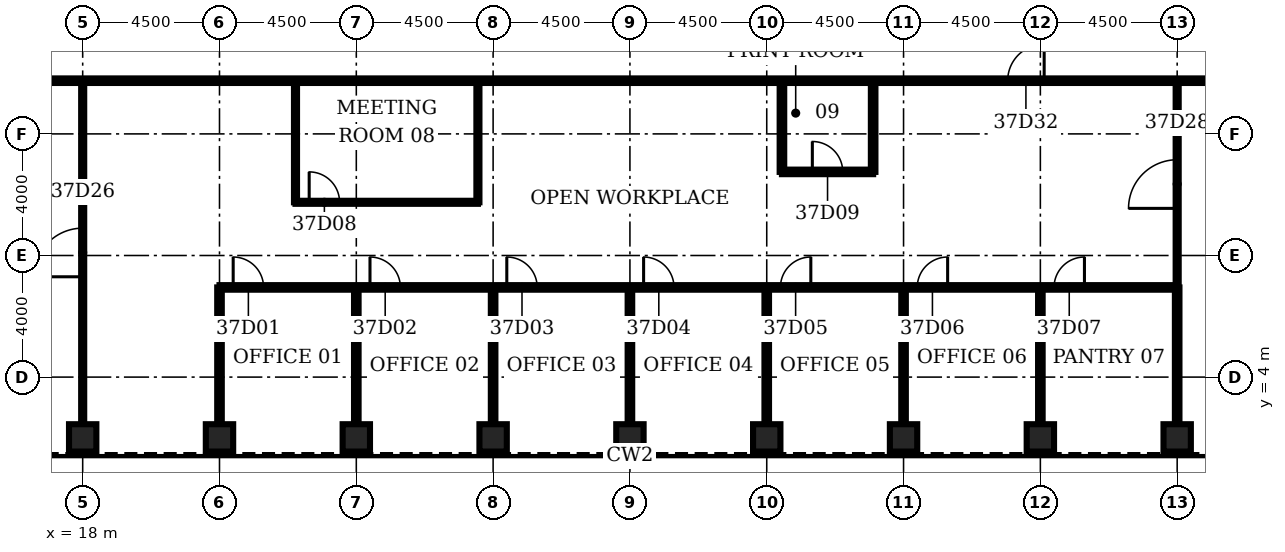
"""IFC4 building model, lengths in metres.
Left out: names, types, materials, properties, quantities, classifications, styles, units other than length and angle.
Written with IfcOpenShell. Run it as: python <this file> out.ifc"""

import sys

from ifc_helpers import new_model, si_unit, direction, frame, frame_2d, origin, origin_2d, place, context, subcontext, project, spatial, rectangle, hollow_rectangle, extrude, element, fill, save


model = new_model("IFC4")
c1 = context("Model", 3, precision=1e-05, world=origin(), true_north=direction((0.0, 1.0)))
c2 = subcontext(c1, "Body", "Model", "MODEL_VIEW")
j1 = project(units=[si_unit("LENGTHUNIT", "METRE"), si_unit("PLANEANGLEUNIT", "RADIAN")], contexts=[c1])
p1 = place(None, origin())
s1 = spatial("IfcSite", under=j1, at=p1, CompositionType="ELEMENT")
p2 = place(p1, origin())
s2 = spatial("IfcBuilding", under=s1, at=p2, CompositionType="ELEMENT")
p3 = place(p2, frame((0.0, 0.0, 167.7)))
s3 = spatial("IfcBuildingStorey", under=s2, at=p3, CompositionType="ELEMENT", Elevation=167.7)
for number, where, z_axis, x_axis in (
    (1, (18.0, 2.0, 0.0), (0.0, 0.0, 1.0), (0.0, 1.0, 0.0)),
    (2, (22.5, 2.0, 0.0), (0.0, 0.0, 1.0), (0.0, 1.0, 0.0)),
    (3, (27.0, 2.0, 0.0), (0.0, 0.0, 1.0), (0.0, 1.0, 0.0)),
    (4, (31.5, 2.0, 0.0), (0.0, 0.0, 1.0), (0.0, 1.0, 0.0)),
    (5, (36.0, 2.0, 0.0), (0.0, 0.0, 1.0), (0.0, 1.0, 0.0)),
    (6, (40.5, 2.0, 0.0), (0.0, 0.0, 1.0), (0.0, 1.0, 0.0)),
    (7, (45.0, 2.0, 0.0), (0.0, 0.0, 1.0), (0.0, 1.0, 0.0)),
    (8, (49.5, 2.0, 0.0), (0.0, 0.0, 1.0), (0.0, 1.0, 0.0)),
    (9, (54.0, 2.0, 0.0), (0.0, 0.0, 1.0), (0.0, 1.0, 0.0)),
):
    element("IfcColumn", number, at=place(p3, frame(where, z_axis=z_axis, x_axis=x_axis)), inside=s3, PredefinedType="COLUMN", context=c2, shape_type="SweptSolid", body=[
        extrude(hollow_rectangle(XDim=0.9, YDim=0.9, WallThickness=0.09, at=origin_2d()), origin(), (0.0, 0.0, 1.0), 4.2),
    ])
p4 = place(p3, frame((22.5, 6.95, 0.0), z_axis=(0.0, 0.0, 1.0), x_axis=(1.0, 0.0, 0.0)))
e10 = element("IfcWall", 10, at=p4, inside=s3, PredefinedType="PARTITIONING", context=c2, shape_type="SweptSolid", body=[
    extrude(rectangle(XDim=31.5, YDim=0.15, at=frame_2d((15.75, 0.0))), origin(), (0.0, 0.0, 1.0), 3.0),
])
p5 = place(p4, frame((0.45, 0.0, 0.0)))
e11 = element("IfcOpeningElement", 11, at=p5, cuts=e10, PredefinedType="OPENING", context=c2, shape_type="SweptSolid", body=[
    extrude(rectangle(XDim=1.0, YDim=2.1, at=frame_2d((0.5, 1.05))), frame((0.0, 0.085, 0.0), z_axis=(0.0, -1.0, 0.0), x_axis=(1.0, 0.0, 0.0)), (0.0, 0.0, 1.0), 0.17),
])
p6 = place(p4, frame((4.95, 0.0, 0.0)))
e12 = element("IfcOpeningElement", 12, at=p6, cuts=e10, PredefinedType="OPENING", context=c2, shape_type="SweptSolid", body=[
    extrude(rectangle(XDim=1.0, YDim=2.1, at=frame_2d((0.5, 1.05))), frame((0.0, 0.085, 0.0), z_axis=(0.0, -1.0, 0.0), x_axis=(1.0, 0.0, 0.0)), (0.0, 0.0, 1.0), 0.17),
])
p7 = place(p4, frame((9.45, 0.0, 0.0)))
e13 = element("IfcOpeningElement", 13, at=p7, cuts=e10, PredefinedType="OPENING", context=c2, shape_type="SweptSolid", body=[
    extrude(rectangle(XDim=1.0, YDim=2.1, at=frame_2d((0.5, 1.05))), frame((0.0, 0.085, 0.0), z_axis=(0.0, -1.0, 0.0), x_axis=(1.0, 0.0, 0.0)), (0.0, 0.0, 1.0), 0.17),
])
p8 = place(p4, frame((13.95, 0.0, 0.0)))
e14 = element("IfcOpeningElement", 14, at=p8, cuts=e10, PredefinedType="OPENING", context=c2, shape_type="SweptSolid", body=[
    extrude(rectangle(XDim=1.0, YDim=2.1, at=frame_2d((0.5, 1.05))), frame((0.0, 0.085, 0.0), z_axis=(0.0, -1.0, 0.0), x_axis=(1.0, 0.0, 0.0)), (0.0, 0.0, 1.0), 0.17),
])
p9 = place(p4, frame((18.45, 0.0, 0.0)))
e15 = element("IfcOpeningElement", 15, at=p9, cuts=e10, PredefinedType="OPENING", context=c2, shape_type="SweptSolid", body=[
    extrude(rectangle(XDim=1.0, YDim=2.1, at=frame_2d((0.5, 1.05))), frame((0.0, 0.085, 0.0), z_axis=(0.0, -1.0, 0.0), x_axis=(1.0, 0.0, 0.0)), (0.0, 0.0, 1.0), 0.17),
])
p10 = place(p4, frame((22.95, 0.0, 0.0)))
e16 = element("IfcOpeningElement", 16, at=p10, cuts=e10, PredefinedType="OPENING", context=c2, shape_type="SweptSolid", body=[
    extrude(rectangle(XDim=1.0, YDim=2.1, at=frame_2d((0.5, 1.05))), frame((0.0, 0.085, 0.0), z_axis=(0.0, -1.0, 0.0), x_axis=(1.0, 0.0, 0.0)), (0.0, 0.0, 1.0), 0.17),
])
p11 = place(p4, frame((27.45, 0.0, 0.0)))
e17 = element("IfcOpeningElement", 17, at=p11, cuts=e10, PredefinedType="OPENING", context=c2, shape_type="SweptSolid", body=[
    extrude(rectangle(XDim=1.0, YDim=2.1, at=frame_2d((0.5, 1.05))), frame((0.0, 0.085, 0.0), z_axis=(0.0, -1.0, 0.0), x_axis=(1.0, 0.0, 0.0)), (0.0, 0.0, 1.0), 0.17),
])
p12 = place(p3, frame((25.0, 9.75, 0.0), z_axis=(0.0, 0.0, 1.0), x_axis=(1.0, 0.0, 0.0)))
e18 = element("IfcWall", 18, at=p12, inside=s3, PredefinedType="PARTITIONING", context=c2, shape_type="SweptSolid", body=[
    extrude(rectangle(XDim=6.0, YDim=0.1, at=frame_2d((3.0, 0.0))), origin(), (0.0, 0.0, 1.0), 3.0),
])
p13 = place(p12, frame((0.45, 0.0, 0.0)))
e19 = element("IfcOpeningElement", 19, at=p13, cuts=e18, PredefinedType="OPENING", context=c2, shape_type="SweptSolid", body=[
    extrude(rectangle(XDim=1.0, YDim=2.1, at=frame_2d((0.5, 1.05))), frame((0.0, 0.06, 0.0), z_axis=(0.0, -1.0, 0.0), x_axis=(1.0, 0.0, 0.0)), (0.0, 0.0, 1.0), 0.12),
])
p14 = place(p3, frame((41.0, 10.75, 0.0), z_axis=(0.0, 0.0, 1.0), x_axis=(1.0, 0.0, 0.0)))
e20 = element("IfcWall", 20, at=p14, inside=s3, PredefinedType="PARTITIONING", context=c2, shape_type="SweptSolid", body=[
    extrude(rectangle(XDim=3.0, YDim=0.15, at=frame_2d((1.5, 0.0))), origin(), (0.0, 0.0, 1.0), 3.0),
])
p15 = place(p14, frame((1.0, 0.0, 0.0)))
e21 = element("IfcOpeningElement", 21, at=p15, cuts=e20, PredefinedType="OPENING", context=c2, shape_type="SweptSolid", body=[
    extrude(rectangle(XDim=1.0, YDim=2.1, at=frame_2d((0.5, 1.05))), frame((0.0, 0.085, 0.0), z_axis=(0.0, -1.0, 0.0), x_axis=(1.0, 0.0, 0.0)), (0.0, 0.0, 1.0), 0.17),
])
p16 = place(p3, frame((15.15, 13.75, 0.0), z_axis=(0.0, 0.0, 1.0), x_axis=(1.0, 0.0, 0.0)))
e22 = element("IfcWall", 22, at=p16, inside=s3, PredefinedType="PARTITIONING", context=c2, shape_type="SweptSolid", body=[
    extrude(rectangle(XDim=41.7, YDim=0.15, at=frame_2d((20.85, 0.0))), origin(), (0.0, 0.0, 1.0), 3.0),
])
p17 = place(p16, frame((33.275, 0.0, 0.0)))
e23 = element("IfcOpeningElement", 23, at=p17, cuts=e22, PredefinedType="OPENING", context=c2, shape_type="SweptSolid", body=[
    extrude(rectangle(XDim=1.2, YDim=2.1, at=frame_2d((0.6, 1.05))), frame((0.0, 0.085, 0.0), z_axis=(0.0, -1.0, 0.0), x_axis=(1.0, 0.0, 0.0)), (0.0, 0.0, 1.0), 0.17),
])
p18 = place(p3, frame((18.0, 2.45, 0.0), z_axis=(0.0, 0.0, 1.0), x_axis=(0.0, 1.0, 0.0)))
e24 = element("IfcWall", 24, at=p18, inside=s3, PredefinedType="PARTITIONING", context=c2, shape_type="SweptSolid", body=[
    extrude(rectangle(XDim=11.3, YDim=0.1, at=frame_2d((5.65, 0.0))), origin(), (0.0, 0.0, 1.0), 3.0),
])
p19 = place(p18, frame((4.85, 0.0, 0.0)))
e25 = element("IfcOpeningElement", 25, at=p19, cuts=e24, PredefinedType="OPENING", context=c2, shape_type="SweptSolid", body=[
    extrude(rectangle(XDim=1.6, YDim=2.1, at=frame_2d((0.8, 1.05))), frame((0.0, 0.06, 0.0), z_axis=(0.0, -1.0, 0.0), x_axis=(1.0, 0.0, 0.0)), (0.0, 0.0, 1.0), 0.12),
])
p20 = place(p3, frame((22.5, 2.45, 0.0), z_axis=(0.0, 0.0, 1.0), x_axis=(0.0, 1.0, 0.0)))
e26 = element("IfcWall", 26, at=p20, inside=s3, PredefinedType="PARTITIONING", context=c2, shape_type="SweptSolid", body=[
    extrude(rectangle(XDim=4.5, YDim=0.15, at=frame_2d((2.25, 0.0))), origin(), (0.0, 0.0, 1.0), 3.0),
])
p21 = place(p3, frame((25.0, 9.75, 0.0), z_axis=(0.0, 0.0, 1.0), x_axis=(0.0, 1.0, 0.0)))
e27 = element("IfcWall", 27, at=p21, inside=s3, PredefinedType="PARTITIONING", context=c2, shape_type="SweptSolid", body=[
    extrude(rectangle(XDim=4.0, YDim=0.1, at=frame_2d((2.0, 0.0))), origin(), (0.0, 0.0, 1.0), 3.0),
])
p22 = place(p3, frame((27.0, 2.45, 0.0), z_axis=(0.0, 0.0, 1.0), x_axis=(0.0, 1.0, 0.0)))
e28 = element("IfcWall", 28, at=p22, inside=s3, PredefinedType="PARTITIONING", context=c2, shape_type="SweptSolid", body=[
    extrude(rectangle(XDim=4.5, YDim=0.15, at=frame_2d((2.25, 0.0))), origin(), (0.0, 0.0, 1.0), 3.0),
])
p23 = place(p3, frame((31.0, 9.75, 0.0), z_axis=(0.0, 0.0, 1.0), x_axis=(0.0, 1.0, 0.0)))
e29 = element("IfcWall", 29, at=p23, inside=s3, PredefinedType="PARTITIONING", context=c2, shape_type="SweptSolid", body=[
    extrude(rectangle(XDim=4.0, YDim=0.1, at=frame_2d((2.0, 0.0))), origin(), (0.0, 0.0, 1.0), 3.0),
])
for number, where, z_axis, x_axis in (
    (30, (31.5, 2.45, 0.0), (0.0, 0.0, 1.0), (0.0, 1.0, 0.0)),
    (31, (36.0, 2.45, 0.0), (0.0, 0.0, 1.0), (0.0, 1.0, 0.0)),
    (32, (40.5, 2.45, 0.0), (0.0, 0.0, 1.0), (0.0, 1.0, 0.0)),
):
    element("IfcWall", number, at=place(p3, frame(where, z_axis=z_axis, x_axis=x_axis)), inside=s3, PredefinedType="PARTITIONING", context=c2, shape_type="SweptSolid", body=[
        extrude(rectangle(XDim=4.5, YDim=0.15, at=frame_2d((2.25, 0.0))), origin(), (0.0, 0.0, 1.0), 3.0),
    ])
for number, where, z_axis, x_axis in (
    (33, (41.0, 10.75, 0.0), (0.0, 0.0, 1.0), (0.0, 1.0, 0.0)),
    (34, (44.0, 10.75, 0.0), (0.0, 0.0, 1.0), (0.0, 1.0, 0.0)),
):
    element("IfcWall", number, at=place(p3, frame(where, z_axis=z_axis, x_axis=x_axis)), inside=s3, PredefinedType="PARTITIONING", context=c2, shape_type="SweptSolid", body=[
        extrude(rectangle(XDim=3.0, YDim=0.15, at=frame_2d((1.5, 0.0))), origin(), (0.0, 0.0, 1.0), 3.0),
    ])
for number, where, z_axis, x_axis in (
    (35, (45.0, 2.45, 0.0), (0.0, 0.0, 1.0), (0.0, 1.0, 0.0)),
    (36, (49.5, 2.45, 0.0), (0.0, 0.0, 1.0), (0.0, 1.0, 0.0)),
    (37, (54.0, 2.45, 0.0), (0.0, 0.0, 1.0), (0.0, 1.0, 0.0)),
):
    element("IfcWall", number, at=place(p3, frame(where, z_axis=z_axis, x_axis=x_axis)), inside=s3, PredefinedType="PARTITIONING", context=c2, shape_type="SweptSolid", body=[
        extrude(rectangle(XDim=4.5, YDim=0.15, at=frame_2d((2.25, 0.0))), origin(), (0.0, 0.0, 1.0), 3.0),
    ])
p24 = place(p3, frame((54.0, 6.95, 0.0), z_axis=(0.0, 0.0, 1.0), x_axis=(0.0, 1.0, 0.0)))
e38 = element("IfcWall", 38, at=p24, inside=s3, PredefinedType="PARTITIONING", context=c2, shape_type="SweptSolid", body=[
    extrude(rectangle(XDim=6.8, YDim=0.1, at=frame_2d((3.4, 0.0))), origin(), (0.0, 0.0, 1.0), 3.0),
])
p25 = place(p24, frame((2.6, 0.0, 0.0)))
e39 = element("IfcOpeningElement", 39, at=p25, cuts=e38, PredefinedType="OPENING", context=c2, shape_type="SweptSolid", body=[
    extrude(rectangle(XDim=1.6, YDim=2.1, at=frame_2d((0.8, 1.05))), frame((0.0, 0.06, 0.0), z_axis=(0.0, -1.0, 0.0), x_axis=(1.0, 0.0, 0.0)), (0.0, 0.0, 1.0), 0.12),
])
p26 = place(p5, origin())
e40 = element("IfcDoor", 40, at=p26, inside=s3, OperationType="SINGLE_SWING_LEFT", PredefinedType="DOOR", context=c2, shape_type="SweptSolid", body=[
    extrude(rectangle(XDim=1.0, YDim=2.1, at=frame_2d((0.5, 1.05))), frame((0.0, 0.025, 0.0), z_axis=(0.0, -1.0, 0.0), x_axis=(1.0, 0.0, 0.0)), (0.0, 0.0, 1.0), 0.05),
])
fill(e11, e40)
p27 = place(p6, origin())
e41 = element("IfcDoor", 41, at=p27, inside=s3, OperationType="SINGLE_SWING_LEFT", PredefinedType="DOOR", context=c2, shape_type="SweptSolid", body=[
    extrude(rectangle(XDim=1.0, YDim=2.1, at=frame_2d((0.5, 1.05))), frame((0.0, 0.025, 0.0), z_axis=(0.0, -1.0, 0.0), x_axis=(1.0, 0.0, 0.0)), (0.0, 0.0, 1.0), 0.05),
])
fill(e12, e41)
p28 = place(p7, origin())
e42 = element("IfcDoor", 42, at=p28, inside=s3, OperationType="SINGLE_SWING_LEFT", PredefinedType="DOOR", context=c2, shape_type="SweptSolid", body=[
    extrude(rectangle(XDim=1.0, YDim=2.1, at=frame_2d((0.5, 1.05))), frame((0.0, 0.025, 0.0), z_axis=(0.0, -1.0, 0.0), x_axis=(1.0, 0.0, 0.0)), (0.0, 0.0, 1.0), 0.05),
])
fill(e13, e42)
p29 = place(p8, origin())
e43 = element("IfcDoor", 43, at=p29, inside=s3, OperationType="SINGLE_SWING_LEFT", PredefinedType="DOOR", context=c2, shape_type="SweptSolid", body=[
    extrude(rectangle(XDim=1.0, YDim=2.1, at=frame_2d((0.5, 1.05))), frame((0.0, 0.025, 0.0), z_axis=(0.0, -1.0, 0.0), x_axis=(1.0, 0.0, 0.0)), (0.0, 0.0, 1.0), 0.05),
])
fill(e14, e43)
p30 = place(p9, origin())
e44 = element("IfcDoor", 44, at=p30, inside=s3, OperationType="SINGLE_SWING_RIGHT", PredefinedType="DOOR", context=c2, shape_type="SweptSolid", body=[
    extrude(rectangle(XDim=1.0, YDim=2.1, at=frame_2d((0.5, 1.05))), frame((0.0, 0.025, 0.0), z_axis=(0.0, -1.0, 0.0), x_axis=(1.0, 0.0, 0.0)), (0.0, 0.0, 1.0), 0.05),
])
fill(e15, e44)
p31 = place(p10, origin())
e45 = element("IfcDoor", 45, at=p31, inside=s3, OperationType="SINGLE_SWING_RIGHT", PredefinedType="DOOR", context=c2, shape_type="SweptSolid", body=[
    extrude(rectangle(XDim=1.0, YDim=2.1, at=frame_2d((0.5, 1.05))), frame((0.0, 0.025, 0.0), z_axis=(0.0, -1.0, 0.0), x_axis=(1.0, 0.0, 0.0)), (0.0, 0.0, 1.0), 0.05),
])
fill(e16, e45)
p32 = place(p11, origin())
e46 = element("IfcDoor", 46, at=p32, inside=s3, OperationType="SINGLE_SWING_RIGHT", PredefinedType="DOOR", context=c2, shape_type="SweptSolid", body=[
    extrude(rectangle(XDim=1.0, YDim=2.1, at=frame_2d((0.5, 1.05))), frame((0.0, 0.025, 0.0), z_axis=(0.0, -1.0, 0.0), x_axis=(1.0, 0.0, 0.0)), (0.0, 0.0, 1.0), 0.05),
])
fill(e17, e46)
p33 = place(p13, origin())
e47 = element("IfcDoor", 47, at=p33, inside=s3, OperationType="SINGLE_SWING_LEFT", PredefinedType="DOOR", context=c2, shape_type="SweptSolid", body=[
    extrude(rectangle(XDim=1.0, YDim=2.1, at=frame_2d((0.5, 1.05))), frame((0.0, 0.025, 0.0), z_axis=(0.0, -1.0, 0.0), x_axis=(1.0, 0.0, 0.0)), (0.0, 0.0, 1.0), 0.05),
])
fill(e19, e47)
p34 = place(p15, origin())
e48 = element("IfcDoor", 48, at=p34, inside=s3, OperationType="SINGLE_SWING_LEFT", PredefinedType="DOOR", context=c2, shape_type="SweptSolid", body=[
    extrude(rectangle(XDim=1.0, YDim=2.1, at=frame_2d((0.5, 1.05))), frame((0.0, 0.025, 0.0), z_axis=(0.0, -1.0, 0.0), x_axis=(1.0, 0.0, 0.0)), (0.0, 0.0, 1.0), 0.05),
])
fill(e21, e48)
p35 = place(p19, origin())
e49 = element("IfcDoor", 49, at=p35, inside=s3, OperationType="SINGLE_SWING_LEFT", PredefinedType="DOOR", context=c2, shape_type="SweptSolid", body=[
    extrude(rectangle(XDim=1.6, YDim=2.1, at=frame_2d((0.8, 1.05))), frame((0.0, 0.025, 0.0), z_axis=(0.0, -1.0, 0.0), x_axis=(1.0, 0.0, 0.0)), (0.0, 0.0, 1.0), 0.05),
])
fill(e25, e49)
p36 = place(p25, origin())
e50 = element("IfcDoor", 50, at=p36, inside=s3, OperationType="SINGLE_SWING_LEFT", PredefinedType="DOOR", context=c2, shape_type="SweptSolid", body=[
    extrude(rectangle(XDim=1.6, YDim=2.1, at=frame_2d((0.8, 1.05))), frame((0.0, 0.025, 0.0), z_axis=(0.0, -1.0, 0.0), x_axis=(1.0, 0.0, 0.0)), (0.0, 0.0, 1.0), 0.05),
])
fill(e39, e50)
p37 = place(p17, origin())
e51 = element("IfcDoor", 51, at=p37, inside=s3, OperationType="SINGLE_SWING_RIGHT", PredefinedType="DOOR", context=c2, shape_type="SweptSolid", body=[
    extrude(rectangle(XDim=1.2, YDim=2.1, at=frame_2d((0.6, 1.05))), frame((0.0, 0.025, 0.0), z_axis=(0.0, -1.0, 0.0), x_axis=(1.0, 0.0, 0.0)), (0.0, 0.0, 1.0), 0.05),
])
fill(e23, e51)
save(model, sys.argv[1])
